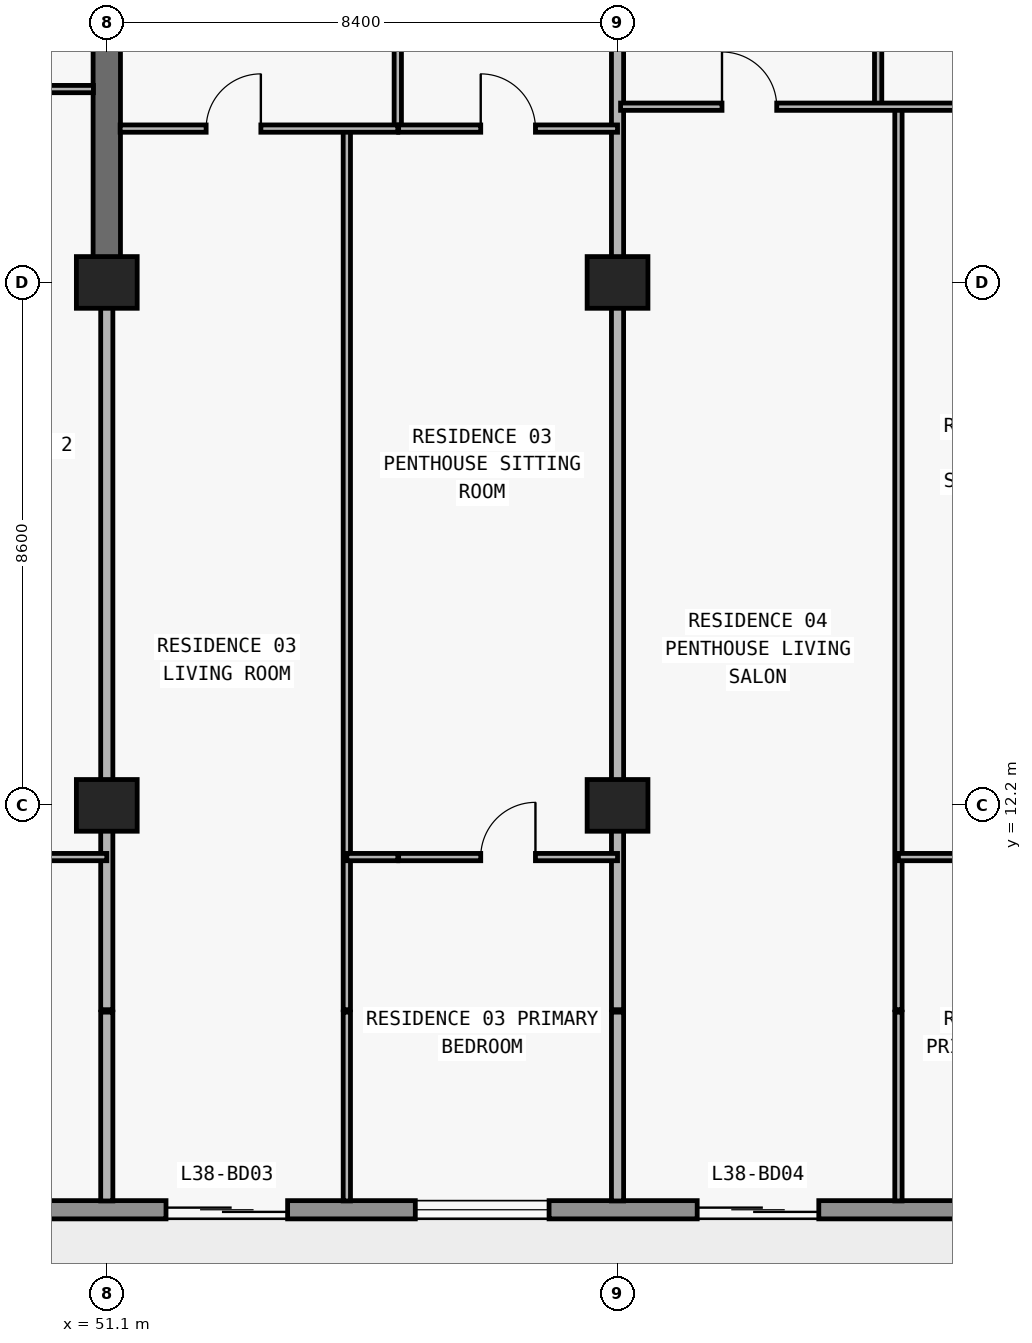
"""IFC4 building model, lengths in metres.
Left out: names, types, materials, properties, quantities, classifications, styles, units other than length and angle.
Written with IfcOpenShell. Run it as: python <this file> out.ifc"""

import sys

from ifc_helpers import new_model, si_unit, direction, frame, frame_2d, origin, origin_2d, place, context, subcontext, project, spatial, rectangle, extrude, element, fill, save


model = new_model("IFC4")
c1 = context("Model", 3, precision=1e-05, world=origin(), true_north=direction((0.0, 1.0)))
c2 = subcontext(c1, "Body", "Model", "MODEL_VIEW")
j1 = project(units=[si_unit("LENGTHUNIT", "METRE"), si_unit("PLANEANGLEUNIT", "RADIAN")], contexts=[c1])
p1 = place(None, origin())
s1 = spatial("IfcSite", under=j1, at=p1, CompositionType="ELEMENT")
p2 = place(p1, origin())
s2 = spatial("IfcBuilding", under=s1, at=p2, CompositionType="ELEMENT")
p3 = place(p2, frame((0.0, 0.0, 138.9)))
s3 = spatial("IfcBuildingStorey", under=s2, at=p3, CompositionType="ELEMENT", Elevation=138.9)
for number, where, z_axis, x_axis in (
    (1, (51.1, 12.2, 0.0), (0.0, 0.0, 1.0), (1.0, 0.0, 0.0)),
    (2, (59.5, 12.2, 0.0), (0.0, 0.0, 1.0), (1.0, 0.0, 0.0)),
    (3, (51.1, 20.8, 0.0), (0.0, 0.0, 1.0), (1.0, 0.0, 0.0)),
    (4, (59.5, 20.8, 0.0), (0.0, 0.0, 1.0), (1.0, 0.0, 0.0)),
):
    element("IfcColumn", number, at=place(p3, frame(where, z_axis=z_axis, x_axis=x_axis)), inside=s3, PredefinedType="COLUMN", context=c2, shape_type="SweptSolid", body=[
        extrude(rectangle(XDim=1.0, YDim=0.85, at=origin_2d()), origin(), (0.0, 0.0, 1.0), 3.05),
    ])
p4 = place(p3, frame((51.1, 20.8, 0.0), z_axis=(0.0, 0.0, 1.0), x_axis=(0.0, 1.0, 0.0)))
e5 = element("IfcWall", 5, at=p4, inside=s3, PredefinedType="SHEAR", context=c2, shape_type="SweptSolid", body=[
    extrude(rectangle(XDim=8.6, YDim=0.45, at=frame_2d((4.3, 0.0))), origin(), (0.0, 0.0, 1.0), 3.05),
])
p5 = place(p3, frame((70.1, 5.55, 0.0), z_axis=(0.0, 0.0, 1.0), x_axis=(-1.0, 0.0, 0.0)))
e6 = element("IfcWall", 6, at=p5, inside=s3, PredefinedType="STANDARD", context=c2, shape_type="SweptSolid", body=[
    extrude(rectangle(XDim=62.4, YDim=0.3, at=frame_2d((31.2, 0.0))), origin(), (0.0, 0.0, 1.0), 3.05),
])
p6 = place(p5, frame((57.29, 0.0, 0.0)))
e7 = element("IfcOpeningElement", 7, at=p6, cuts=e6, PredefinedType="OPENING", context=c2, shape_type="SweptSolid", body=[
    extrude(rectangle(XDim=2.0, YDim=2.3, at=frame_2d((1.0, 1.15))), frame((0.0, 0.16, 0.0), z_axis=(0.0, -1.0, 0.0), x_axis=(1.0, 0.0, 0.0)), (0.0, 0.0, 1.0), 0.32),
])
p7 = place(p5, frame((52.61, 0.0, 0.65)))
e8 = element("IfcOpeningElement", 8, at=p7, cuts=e6, PredefinedType="OPENING", context=c2, shape_type="SweptSolid", body=[
    extrude(rectangle(XDim=2.6, YDim=1.85, at=frame_2d((1.3, 0.925))), frame((0.0, 0.16, 0.0), z_axis=(0.0, -1.0, 0.0), x_axis=(1.0, 0.0, 0.0)), (0.0, 0.0, 1.0), 0.32),
])
p8 = place(p5, frame((46.5, 0.0, 0.85)))
e9 = element("IfcOpeningElement", 9, at=p8, cuts=e6, PredefinedType="OPENING", context=c2, shape_type="SweptSolid", body=[
    extrude(rectangle(XDim=2.2, YDim=1.55, at=frame_2d((1.1, 0.775))), frame((0.0, 0.16, 0.0), z_axis=(0.0, -1.0, 0.0), x_axis=(1.0, 0.0, 0.0)), (0.0, 0.0, 1.0), 0.32),
])
p9 = place(p5, frame((40.49, 0.0, 0.0)))
e10 = element("IfcOpeningElement", 10, at=p9, cuts=e6, PredefinedType="OPENING", context=c2, shape_type="SweptSolid", body=[
    extrude(rectangle(XDim=2.0, YDim=2.3, at=frame_2d((1.0, 1.15))), frame((0.0, 0.16, 0.0), z_axis=(0.0, -1.0, 0.0), x_axis=(1.0, 0.0, 0.0)), (0.0, 0.0, 1.0), 0.32),
])
p10 = place(p5, frame((35.81, 0.0, 0.65)))
e11 = element("IfcOpeningElement", 11, at=p10, cuts=e6, PredefinedType="OPENING", context=c2, shape_type="SweptSolid", body=[
    extrude(rectangle(XDim=2.6, YDim=1.85, at=frame_2d((1.3, 0.925))), frame((0.0, 0.16, 0.0), z_axis=(0.0, -1.0, 0.0), x_axis=(1.0, 0.0, 0.0)), (0.0, 0.0, 1.0), 0.32),
])
p11 = place(p5, frame((30.1, 0.0, 0.85)))
e12 = element("IfcOpeningElement", 12, at=p11, cuts=e6, PredefinedType="OPENING", context=c2, shape_type="SweptSolid", body=[
    extrude(rectangle(XDim=2.2, YDim=1.55, at=frame_2d((1.1, 0.775))), frame((0.0, 0.16, 0.0), z_axis=(0.0, -1.0, 0.0), x_axis=(1.0, 0.0, 0.0)), (0.0, 0.0, 1.0), 0.32),
])
p12 = place(p5, frame((22.1, 0.0, 0.85)))
e13 = element("IfcOpeningElement", 13, at=p12, cuts=e6, PredefinedType="OPENING", context=c2, shape_type="SweptSolid", body=[
    extrude(rectangle(XDim=2.2, YDim=1.55, at=frame_2d((1.1, 0.775))), frame((0.0, 0.16, 0.0), z_axis=(0.0, -1.0, 0.0), x_axis=(1.0, 0.0, 0.0)), (0.0, 0.0, 1.0), 0.32),
])
p13 = place(p5, frame((16.026, 0.0, 0.0)))
e14 = element("IfcOpeningElement", 14, at=p13, cuts=e6, PredefinedType="OPENING", context=c2, shape_type="SweptSolid", body=[
    extrude(rectangle(XDim=2.0, YDim=2.3, at=frame_2d((1.0, 1.15))), frame((0.0, 0.16, 0.0), z_axis=(0.0, -1.0, 0.0), x_axis=(1.0, 0.0, 0.0)), (0.0, 0.0, 1.0), 0.32),
])
p14 = place(p5, frame((11.726, 0.0, 0.85)))
e15 = element("IfcOpeningElement", 15, at=p14, cuts=e6, PredefinedType="OPENING", context=c2, shape_type="SweptSolid", body=[
    extrude(rectangle(XDim=2.2, YDim=1.55, at=frame_2d((1.1, 0.775))), frame((0.0, 0.16, 0.0), z_axis=(0.0, -1.0, 0.0), x_axis=(1.0, 0.0, 0.0)), (0.0, 0.0, 1.0), 0.32),
])
p15 = place(p5, frame((7.29, 0.0, 0.0)))
e16 = element("IfcOpeningElement", 16, at=p15, cuts=e6, PredefinedType="OPENING", context=c2, shape_type="SweptSolid", body=[
    extrude(rectangle(XDim=2.0, YDim=2.3, at=frame_2d((1.0, 1.15))), frame((0.0, 0.16, 0.0), z_axis=(0.0, -1.0, 0.0), x_axis=(1.0, 0.0, 0.0)), (0.0, 0.0, 1.0), 0.32),
])
p16 = place(p5, frame((3.19, 0.0, 0.85)))
e17 = element("IfcOpeningElement", 17, at=p16, cuts=e6, PredefinedType="OPENING", context=c2, shape_type="SweptSolid", body=[
    extrude(rectangle(XDim=1.8, YDim=1.55, at=frame_2d((0.9, 0.775))), frame((0.0, 0.16, 0.0), z_axis=(0.0, -1.0, 0.0), x_axis=(1.0, 0.0, 0.0)), (0.0, 0.0, 1.0), 0.32),
])
p17 = place(p3, frame((51.1, 5.695, 0.0), z_axis=(0.0, 0.0, 1.0), x_axis=(0.0, 1.0, 0.0)))
e18 = element("IfcWall", 18, at=p17, inside=s3, PredefinedType="PARTITIONING", context=c2, shape_type="SweptSolid", body=[
    extrude(rectangle(XDim=3.105, YDim=0.2, at=frame_2d((1.552, 0.0))), origin(), (0.0, 0.0, 1.0), 3.05),
])
p18 = place(p3, frame((51.1, 8.84, 0.0), z_axis=(0.0, 0.0, 1.0), x_axis=(0.0, 1.0, 0.0)))
e19 = element("IfcWall", 19, at=p18, inside=s3, PredefinedType="PARTITIONING", context=c2, shape_type="SweptSolid", body=[
    extrude(rectangle(XDim=11.955, YDim=0.2, at=frame_2d((5.978, 0.0))), origin(), (0.0, 0.0, 1.0), 2.174),
])
p19 = place(p3, frame((55.048, 5.695, 0.0), z_axis=(0.0, 0.0, 1.0), x_axis=(0.0, 1.0, 0.0)))
e20 = element("IfcWall", 20, at=p19, inside=s3, PredefinedType="PARTITIONING", context=c2, shape_type="SweptSolid", body=[
    extrude(rectangle(XDim=3.105, YDim=0.12, at=frame_2d((1.552, 0.0))), origin(), (0.0, 0.0, 1.0), 3.05),
])
p20 = place(p3, frame((55.048, 8.84, 0.0), z_axis=(0.0, 0.0, 1.0), x_axis=(0.0, 1.0, 0.0)))
e21 = element("IfcWall", 21, at=p20, inside=s3, PredefinedType="PARTITIONING", context=c2, shape_type="SweptSolid", body=[
    extrude(rectangle(XDim=14.49, YDim=0.12, at=frame_2d((7.245, 0.0))), origin(), (0.0, 0.0, 1.0), 3.05),
])
p21 = place(p3, frame((55.886, 23.33, 0.0), z_axis=(0.0, 0.0, 1.0), x_axis=(0.0, 1.0, 0.0)))
e22 = element("IfcWall", 22, at=p21, inside=s3, PredefinedType="PARTITIONING", context=c2, shape_type="SweptSolid", body=[
    extrude(rectangle(XDim=5.15, YDim=0.12, at=frame_2d((2.575, 0.0))), origin(), (0.0, 0.0, 1.0), 3.05),
])
p22 = place(p21, frame((2.125, 0.0, 0.0)))
e23 = element("IfcOpeningElement", 23, at=p22, cuts=e22, PredefinedType="OPENING", context=c2, shape_type="SweptSolid", body=[
    extrude(rectangle(XDim=0.9, YDim=2.15, at=frame_2d((0.45, 1.075))), frame((0.0, 0.07, 0.0), z_axis=(0.0, -1.0, 0.0), x_axis=(1.0, 0.0, 0.0)), (0.0, 0.0, 1.0), 0.14),
])
p23 = place(p3, frame((59.5, 5.695, 0.0), z_axis=(0.0, 0.0, 1.0), x_axis=(0.0, 1.0, 0.0)))
e24 = element("IfcWall", 24, at=p23, inside=s3, PredefinedType="PARTITIONING", context=c2, shape_type="SweptSolid", body=[
    extrude(rectangle(XDim=3.105, YDim=0.2, at=frame_2d((1.552, 0.0))), origin(), (0.0, 0.0, 1.0), 3.05),
])
p24 = place(p3, frame((59.5, 8.84, 0.0), z_axis=(0.0, 0.0, 1.0), x_axis=(0.0, 1.0, 0.0)))
e25 = element("IfcWall", 25, at=p24, inside=s3, PredefinedType="PARTITIONING", context=c2, shape_type="SweptSolid", body=[
    extrude(rectangle(XDim=19.94, YDim=0.2, at=frame_2d((9.97, 0.0))), origin(), (0.0, 0.0, 1.0), 2.174),
])
p25 = place(p3, frame((63.786, 23.69, 0.0), z_axis=(0.0, 0.0, 1.0), x_axis=(0.0, 1.0, 0.0)))
e26 = element("IfcWall", 26, at=p25, inside=s3, PredefinedType="PARTITIONING", context=c2, shape_type="SweptSolid", body=[
    extrude(rectangle(XDim=5.09, YDim=0.12, at=frame_2d((2.545, 0.0))), origin(), (0.0, 0.0, 1.0), 3.05),
])
p26 = place(p25, frame((2.095, 0.0, 0.0)))
e27 = element("IfcOpeningElement", 27, at=p26, cuts=e26, PredefinedType="OPENING", context=c2, shape_type="SweptSolid", body=[
    extrude(rectangle(XDim=0.9, YDim=2.15, at=frame_2d((0.45, 1.075))), frame((0.0, 0.07, 0.0), z_axis=(0.0, -1.0, 0.0), x_axis=(1.0, 0.0, 0.0)), (0.0, 0.0, 1.0), 0.14),
])
p27 = place(p3, frame((64.12, 5.695, 0.0), z_axis=(0.0, 0.0, 1.0), x_axis=(0.0, 1.0, 0.0)))
e28 = element("IfcWall", 28, at=p27, inside=s3, PredefinedType="PARTITIONING", context=c2, shape_type="SweptSolid", body=[
    extrude(rectangle(XDim=3.105, YDim=0.12, at=frame_2d((1.552, 0.0))), origin(), (0.0, 0.0, 1.0), 3.05),
])
p28 = place(p3, frame((64.12, 8.84, 0.0), z_axis=(0.0, 0.0, 1.0), x_axis=(0.0, 1.0, 0.0)))
e29 = element("IfcWall", 29, at=p28, inside=s3, PredefinedType="PARTITIONING", context=c2, shape_type="SweptSolid", body=[
    extrude(rectangle(XDim=14.85, YDim=0.12, at=frame_2d((7.425, 0.0))), origin(), (0.0, 0.0, 1.0), 3.05),
])
p29 = place(p3, frame((35.1, 11.35, 0.0), z_axis=(0.0, 0.0, 1.0), x_axis=(1.0, 0.0, 0.0)))
e30 = element("IfcWall", 30, at=p29, inside=s3, PredefinedType="PARTITIONING", context=c2, shape_type="SweptSolid", body=[
    extrude(rectangle(XDim=16.0, YDim=0.12, at=frame_2d((8.0, 0.0))), origin(), (0.0, 0.0, 1.0), 3.05),
])
p30 = place(p29, frame((3.35, 0.0, 0.0)))
e31 = element("IfcOpeningElement", 31, at=p30, cuts=e30, PredefinedType="OPENING", context=c2, shape_type="SweptSolid", body=[
    extrude(rectangle(XDim=0.9, YDim=2.15, at=frame_2d((0.45, 1.075))), frame((0.0, 0.07, 0.0), z_axis=(0.0, -1.0, 0.0), x_axis=(1.0, 0.0, 0.0)), (0.0, 0.0, 1.0), 0.14),
])
p31 = place(p29, frame((11.35, 0.0, 0.0)))
e32 = element("IfcOpeningElement", 32, at=p31, cuts=e30, PredefinedType="OPENING", context=c2, shape_type="SweptSolid", body=[
    extrude(rectangle(XDim=0.9, YDim=2.15, at=frame_2d((0.45, 1.075))), frame((0.0, 0.07, 0.0), z_axis=(0.0, -1.0, 0.0), x_axis=(1.0, 0.0, 0.0)), (0.0, 0.0, 1.0), 0.14),
])
p32 = place(p3, frame((55.048, 11.35, 0.0), z_axis=(0.0, 0.0, 1.0), x_axis=(1.0, 0.0, 0.0)))
e33 = element("IfcWall", 33, at=p32, inside=s3, PredefinedType="PARTITIONING", context=c2, shape_type="SweptSolid", body=[
    extrude(rectangle(XDim=0.838, YDim=0.12, at=frame_2d((0.419, 0.0))), origin(), (0.0, 0.0, 1.0), 3.05),
])
p33 = place(p3, frame((55.9, 11.35, 0.0), z_axis=(0.0, 0.0, 1.0), x_axis=(1.0, 0.0, 0.0)))
e34 = element("IfcWall", 34, at=p33, inside=s3, PredefinedType="PARTITIONING", context=c2, shape_type="SweptSolid", body=[
    extrude(rectangle(XDim=3.6, YDim=0.12, at=frame_2d((1.8, 0.0))), origin(), (0.0, 0.0, 1.0), 3.05),
])
p34 = place(p33, frame((1.35, 0.0, 0.0)))
e35 = element("IfcOpeningElement", 35, at=p34, cuts=e34, PredefinedType="OPENING", context=c2, shape_type="SweptSolid", body=[
    extrude(rectangle(XDim=0.9, YDim=2.15, at=frame_2d((0.45, 1.075))), frame((0.0, 0.07, 0.0), z_axis=(0.0, -1.0, 0.0), x_axis=(1.0, 0.0, 0.0)), (0.0, 0.0, 1.0), 0.14),
])
p35 = place(p3, frame((64.12, 11.35, 0.0), z_axis=(0.0, 0.0, 1.0), x_axis=(1.0, 0.0, 0.0)))
e36 = element("IfcWall", 36, at=p35, inside=s3, PredefinedType="PARTITIONING", context=c2, shape_type="SweptSolid", body=[
    extrude(rectangle(XDim=3.78, YDim=0.12, at=frame_2d((1.89, 0.0))), origin(), (0.0, 0.0, 1.0), 3.05),
])
p36 = place(p35, frame((1.44, 0.0, 0.0)))
e37 = element("IfcOpeningElement", 37, at=p36, cuts=e36, PredefinedType="OPENING", context=c2, shape_type="SweptSolid", body=[
    extrude(rectangle(XDim=0.9, YDim=2.15, at=frame_2d((0.45, 1.075))), frame((0.0, 0.07, 0.0), z_axis=(0.0, -1.0, 0.0), x_axis=(1.0, 0.0, 0.0)), (0.0, 0.0, 1.0), 0.14),
])
p37 = place(p3, frame((51.32, 23.33, 0.0), z_axis=(0.0, 0.0, 1.0), x_axis=(1.0, 0.0, 0.0)))
e38 = element("IfcWall", 38, at=p37, inside=s3, PredefinedType="PARTITIONING", context=c2, shape_type="SweptSolid", body=[
    extrude(rectangle(XDim=4.566, YDim=0.12, at=frame_2d((2.283, 0.0))), origin(), (0.0, 0.0, 1.0), 3.05),
])
p38 = place(p37, frame((1.414, 0.0, 0.0)))
e39 = element("IfcOpeningElement", 39, at=p38, cuts=e38, PredefinedType="OPENING", context=c2, shape_type="SweptSolid", body=[
    extrude(rectangle(XDim=0.9, YDim=2.15, at=frame_2d((0.45, 1.075))), frame((0.0, 0.07, 0.0), z_axis=(0.0, -1.0, 0.0), x_axis=(1.0, 0.0, 0.0)), (0.0, 0.0, 1.0), 0.14),
])
p39 = place(p3, frame((55.9, 23.33, 0.0), z_axis=(0.0, 0.0, 1.0), x_axis=(1.0, 0.0, 0.0)))
e40 = element("IfcWall", 40, at=p39, inside=s3, PredefinedType="PARTITIONING", context=c2, shape_type="SweptSolid", body=[
    extrude(rectangle(XDim=3.6, YDim=0.12, at=frame_2d((1.8, 0.0))), origin(), (0.0, 0.0, 1.0), 3.05),
])
p40 = place(p39, frame((1.35, 0.0, 0.0)))
e41 = element("IfcOpeningElement", 41, at=p40, cuts=e40, PredefinedType="OPENING", context=c2, shape_type="SweptSolid", body=[
    extrude(rectangle(XDim=0.9, YDim=2.15, at=frame_2d((0.45, 1.075))), frame((0.0, 0.07, 0.0), z_axis=(0.0, -1.0, 0.0), x_axis=(1.0, 0.0, 0.0)), (0.0, 0.0, 1.0), 0.14),
])
p41 = place(p3, frame((59.55, 23.69, 0.0), z_axis=(0.0, 0.0, 1.0), x_axis=(1.0, 0.0, 0.0)))
e42 = element("IfcWall", 42, at=p41, inside=s3, PredefinedType="PARTITIONING", context=c2, shape_type="SweptSolid", body=[
    extrude(rectangle(XDim=8.35, YDim=0.12, at=frame_2d((4.175, 0.0))), origin(), (0.0, 0.0, 1.0), 3.05),
])
p42 = place(p41, frame((1.668, 0.0, 0.0)))
e43 = element("IfcOpeningElement", 43, at=p42, cuts=e42, PredefinedType="OPENING", context=c2, shape_type="SweptSolid", body=[
    extrude(rectangle(XDim=0.9, YDim=2.15, at=frame_2d((0.45, 1.075))), frame((0.0, 0.07, 0.0), z_axis=(0.0, -1.0, 0.0), x_axis=(1.0, 0.0, 0.0)), (0.0, 0.0, 1.0), 0.14),
])
p43 = place(p41, frame((6.01, 0.0, 0.0)))
e44 = element("IfcOpeningElement", 44, at=p43, cuts=e42, PredefinedType="OPENING", context=c2, shape_type="SweptSolid", body=[
    extrude(rectangle(XDim=0.9, YDim=2.15, at=frame_2d((0.45, 1.075))), frame((0.0, 0.07, 0.0), z_axis=(0.0, -1.0, 0.0), x_axis=(1.0, 0.0, 0.0)), (0.0, 0.0, 1.0), 0.14),
])
p44 = place(p3, frame((42.7, 23.98, 0.0), z_axis=(0.0, 0.0, 1.0), x_axis=(1.0, 0.0, 0.0)))
e45 = element("IfcWall", 45, at=p44, inside=s3, PredefinedType="PARTITIONING", context=c2, shape_type="SweptSolid", body=[
    extrude(rectangle(XDim=8.18, YDim=0.12, at=frame_2d((4.09, 0.0))), origin(), (0.0, 0.0, 1.0), 3.05),
])
p45 = place(p44, frame((3.64, 0.0, 0.0)))
e46 = element("IfcOpeningElement", 46, at=p45, cuts=e45, PredefinedType="OPENING", context=c2, shape_type="SweptSolid", body=[
    extrude(rectangle(XDim=0.9, YDim=2.15, at=frame_2d((0.45, 1.075))), frame((0.0, 0.07, 0.0), z_axis=(0.0, -1.0, 0.0), x_axis=(1.0, 0.0, 0.0)), (0.0, 0.0, 1.0), 0.14),
])
p46 = place(p13, origin())
e47 = element("IfcDoor", 47, at=p46, inside=s3, OperationType="DOUBLE_DOOR_SLIDING", PredefinedType="DOOR", context=c2, shape_type="SweptSolid", body=[
    extrude(rectangle(XDim=2.0, YDim=2.3, at=frame_2d((1.0, 1.15))), frame((0.0, 0.025, 0.0), z_axis=(0.0, -1.0, 0.0), x_axis=(1.0, 0.0, 0.0)), (0.0, 0.0, 1.0), 0.05),
])
fill(e14, e47)
p47 = place(p14, origin())
e48 = element("IfcWindow", 48, at=p47, inside=s3, PartitioningType="SINGLE_PANEL", PredefinedType="WINDOW", context=c2, shape_type="SweptSolid", body=[
    extrude(rectangle(XDim=2.2, YDim=1.55, at=frame_2d((1.1, 0.775))), frame((0.0, 0.03, 0.0), z_axis=(0.0, -1.0, 0.0), x_axis=(1.0, 0.0, 0.0)), (0.0, 0.0, 1.0), 0.06),
])
fill(e15, e48)
p48 = place(p15, origin())
e49 = element("IfcDoor", 49, at=p48, inside=s3, OperationType="DOUBLE_DOOR_SLIDING", PredefinedType="DOOR", context=c2, shape_type="SweptSolid", body=[
    extrude(rectangle(XDim=2.0, YDim=2.3, at=frame_2d((1.0, 1.15))), frame((0.0, 0.025, 0.0), z_axis=(0.0, -1.0, 0.0), x_axis=(1.0, 0.0, 0.0)), (0.0, 0.0, 1.0), 0.05),
])
fill(e16, e49)
p49 = place(p38, origin())
e50 = element("IfcDoor", 50, at=p49, inside=s3, OperationType="SINGLE_SWING_RIGHT", PredefinedType="DOOR", context=c2, shape_type="SweptSolid", body=[
    extrude(rectangle(XDim=0.9, YDim=2.15, at=frame_2d((0.45, 1.075))), frame((0.0, 0.025, 0.0), z_axis=(0.0, -1.0, 0.0), x_axis=(1.0, 0.0, 0.0)), (0.0, 0.0, 1.0), 0.05),
])
fill(e39, e50)
p50 = place(p40, origin())
e51 = element("IfcDoor", 51, at=p50, inside=s3, OperationType="SINGLE_SWING_LEFT", PredefinedType="DOOR", context=c2, shape_type="SweptSolid", body=[
    extrude(rectangle(XDim=0.9, YDim=2.15, at=frame_2d((0.45, 1.075))), frame((0.0, 0.025, 0.0), z_axis=(0.0, -1.0, 0.0), x_axis=(1.0, 0.0, 0.0)), (0.0, 0.0, 1.0), 0.05),
])
fill(e41, e51)
p51 = place(p34, origin())
e52 = element("IfcDoor", 52, at=p51, inside=s3, OperationType="SINGLE_SWING_RIGHT", PredefinedType="DOOR", context=c2, shape_type="SweptSolid", body=[
    extrude(rectangle(XDim=0.9, YDim=2.15, at=frame_2d((0.45, 1.075))), frame((0.0, 0.025, 0.0), z_axis=(0.0, -1.0, 0.0), x_axis=(1.0, 0.0, 0.0)), (0.0, 0.0, 1.0), 0.05),
])
fill(e35, e52)
p52 = place(p42, origin())
e53 = element("IfcDoor", 53, at=p52, inside=s3, OperationType="SINGLE_SWING_LEFT", PredefinedType="DOOR", context=c2, shape_type="SweptSolid", body=[
    extrude(rectangle(XDim=0.9, YDim=2.15, at=frame_2d((0.45, 1.075))), frame((0.0, 0.025, 0.0), z_axis=(0.0, -1.0, 0.0), x_axis=(1.0, 0.0, 0.0)), (0.0, 0.0, 1.0), 0.05),
])
fill(e43, e53)
save(model, sys.argv[1])
